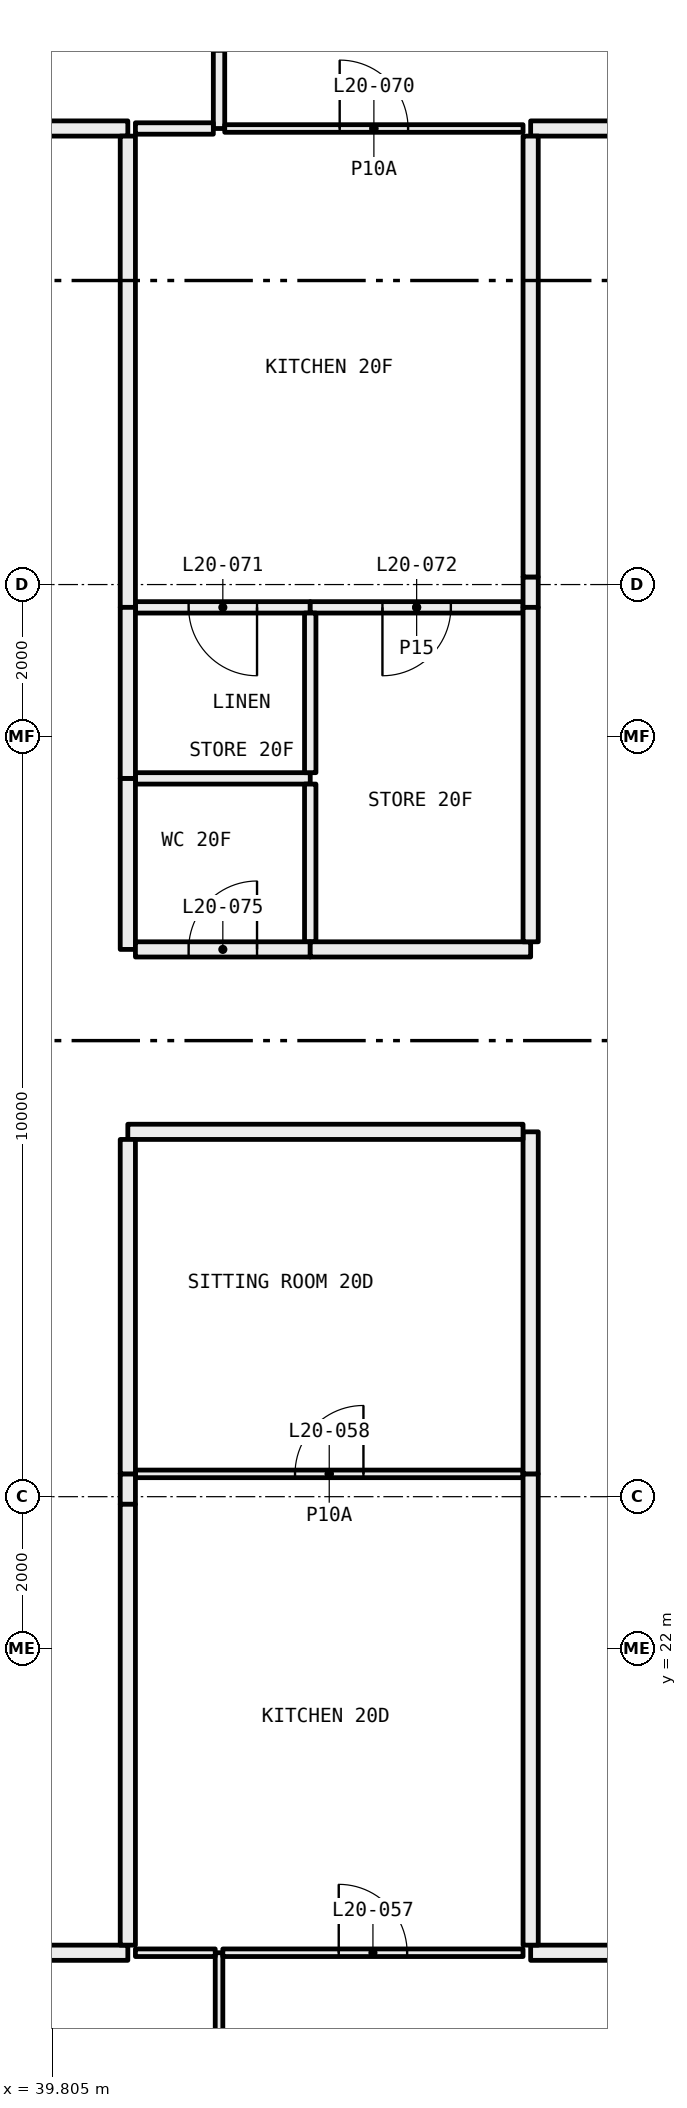
"""IFC4 building model, lengths in metres.
Left out: names, types, materials, properties, quantities, classifications, styles, units other than length and angle.
Written with IfcOpenShell. Run it as: python <this file> out.ifc"""

import sys

from ifc_helpers import new_model, si_unit, direction, frame, frame_2d, origin, place, context, subcontext, project, spatial, rectangle, extrude, element, fill, save


model = new_model("IFC4")
c1 = context("Model", 3, precision=1e-05, world=origin(), true_north=direction((0.0, 1.0)))
c2 = subcontext(c1, "Body", "Model", "MODEL_VIEW")
j1 = project(units=[si_unit("LENGTHUNIT", "METRE"), si_unit("PLANEANGLEUNIT", "RADIAN")], contexts=[c1])
p1 = place(None, origin())
s1 = spatial("IfcSite", under=j1, at=p1, CompositionType="ELEMENT")
p2 = place(p1, origin())
s2 = spatial("IfcBuilding", under=s1, at=p2, CompositionType="ELEMENT")
p3 = place(p2, frame((0.0, 0.0, 81.75)))
s3 = spatial("IfcBuildingStorey", under=s2, at=p3, CompositionType="ELEMENT", Elevation=81.75)
p4 = place(p3, frame((42.0, 12.05, 0.0), z_axis=(0.0, 0.0, 1.0), x_axis=(0.0, 1.0, 0.0)))
e1 = element("IfcWall", 1, at=p4, inside=s3, PredefinedType="PARTITIONING", context=c2, shape_type="SweptSolid", body=[
    extrude(rectangle(XDim=5.95, YDim=0.1, at=frame_2d((2.975, 0.0))), origin(), (0.0, 0.0, 1.0), 2.45),
])
p5 = place(p3, frame((41.95, 18.0, 0.0), z_axis=(0.0, 0.0, 1.0), x_axis=(-1.0, 0.0, 0.0)))
e2 = element("IfcWall", 2, at=p5, inside=s3, PredefinedType="PARTITIONING", context=c2, shape_type="SweptSolid", body=[
    extrude(rectangle(XDim=1.05, YDim=0.1, at=frame_2d((0.525, 0.0))), origin(), (0.0, 0.0, 1.0), 3.05),
])
p6 = place(p3, frame((40.8, 18.0, 0.0), z_axis=(0.0, 0.0, 1.0), x_axis=(-1.0, 0.0, 0.0)))
e3 = element("IfcWall", 3, at=p6, inside=s3, PredefinedType="PARTITIONING", context=c2, shape_type="SweptSolid", body=[
    extrude(rectangle(XDim=2.3, YDim=0.2, at=frame_2d((1.15, 0.0))), origin(), (0.0, 0.0, 1.0), 3.05),
])
p7 = place(p3, frame((46.0, 18.0, 0.0), z_axis=(0.0, 0.0, 1.0), x_axis=(-1.0, 0.0, 0.0)))
e4 = element("IfcWall", 4, at=p7, inside=s3, PredefinedType="PARTITIONING", context=c2, shape_type="SweptSolid", body=[
    extrude(rectangle(XDim=3.95, YDim=0.1, at=frame_2d((1.975, 0.0))), origin(), (0.0, 0.0, 1.0), 3.05),
])
p8 = place(p7, frame((1.525, 0.0, 0.0)))
e5 = element("IfcOpeningElement", 5, at=p8, cuts=e4, PredefinedType="OPENING", context=c2, shape_type="SweptSolid", body=[
    extrude(rectangle(XDim=0.9, YDim=2.1, at=frame_2d((0.45, 1.05))), frame((0.0, 0.06, 0.0), z_axis=(0.0, -1.0, 0.0), x_axis=(1.0, 0.0, 0.0)), (0.0, 0.0, 1.0), 0.12),
])
p9 = place(p3, frame((49.5, 18.0, 0.0), z_axis=(0.0, 0.0, 1.0), x_axis=(-1.0, 0.0, 0.0)))
e6 = element("IfcWall", 6, at=p9, inside=s3, PredefinedType="PARTITIONING", context=c2, shape_type="SweptSolid", body=[
    extrude(rectangle(XDim=3.4, YDim=0.2, at=frame_2d((1.7, 0.0))), origin(), (0.0, 0.0, 1.0), 3.05),
])
p10 = place(p3, frame((46.0, 24.3, 0.0), z_axis=(0.0, 0.0, 1.0), x_axis=(-1.0, 0.0, 0.0)))
e7 = element("IfcWall", 7, at=p10, inside=s3, PredefinedType="PARTITIONING", context=c2, shape_type="SweptSolid", body=[
    extrude(rectangle(XDim=5.1, YDim=0.1, at=frame_2d((2.55, 0.0))), origin(), (0.0, 0.0, 1.0), 3.05),
])
p11 = place(p10, frame((2.1, 0.0, 0.0)))
e8 = element("IfcOpeningElement", 8, at=p11, cuts=e7, PredefinedType="OPENING", context=c2, shape_type="SweptSolid", body=[
    extrude(rectangle(XDim=0.9, YDim=2.1, at=frame_2d((0.45, 1.05))), frame((0.0, 0.06, 0.0), z_axis=(0.0, -1.0, 0.0), x_axis=(1.0, 0.0, 0.0)), (0.0, 0.0, 1.0), 0.12),
])
p12 = place(p3, frame((40.8, 24.3, 0.0), z_axis=(0.0, 0.0, 1.0), x_axis=(0.0, -1.0, 0.0)))
e9 = element("IfcWall", 9, at=p12, inside=s3, PredefinedType="PARTITIONING", context=c2, shape_type="SweptSolid", body=[
    extrude(rectangle(XDim=0.4, YDim=0.2, at=frame_2d((0.2, 0.0))), origin(), (0.0, 0.0, 1.0), 2.45),
])
p13 = place(p3, frame((40.8, 23.9, 0.0), z_axis=(0.0, 0.0, 1.0), x_axis=(0.0, -1.0, 0.0)))
e10 = element("IfcWall", 10, at=p13, inside=s3, PredefinedType="PARTITIONING", context=c2, shape_type="SweptSolid", body=[
    extrude(rectangle(XDim=5.8, YDim=0.2, at=frame_2d((2.9, 0.0))), origin(), (0.0, 0.0, 1.0), 3.05),
])
p14 = place(p3, frame((46.1, 18.1, 0.0), z_axis=(0.0, 0.0, 1.0), x_axis=(0.0, 1.0, 0.0)))
e11 = element("IfcWall", 11, at=p14, inside=s3, PredefinedType="PARTITIONING", context=c2, shape_type="SweptSolid", body=[
    extrude(rectangle(XDim=6.2, YDim=0.2, at=frame_2d((3.1, 0.0))), origin(), (0.0, 0.0, 1.0), 2.45),
])
p15 = place(p3, frame((46.1, 24.3, 0.0), z_axis=(0.0, 0.0, 1.0), x_axis=(0.0, 1.0, 0.0)))
e12 = element("IfcWall", 12, at=p15, inside=s3, PredefinedType="PARTITIONING", context=c2, shape_type="SweptSolid", body=[
    extrude(rectangle(XDim=4.5, YDim=0.2, at=frame_2d((2.25, 0.0))), origin(), (0.0, 0.0, 1.0), 3.05),
])
p16 = place(p3, frame((46.0, 28.8, 0.0), z_axis=(0.0, 0.0, 1.0), x_axis=(-1.0, 0.0, 0.0)))
e13 = element("IfcWall", 13, at=p16, inside=s3, PredefinedType="PARTITIONING", context=c2, shape_type="SweptSolid", body=[
    extrude(rectangle(XDim=5.2, YDim=0.2, at=frame_2d((2.6, 0.0))), origin(), (0.0, 0.0, 1.0), 3.05),
])
p17 = place(p3, frame((40.8, 28.7, 0.0), z_axis=(0.0, 0.0, 1.0), x_axis=(0.0, -1.0, 0.0)))
e14 = element("IfcWall", 14, at=p17, inside=s3, PredefinedType="PARTITIONING", context=c2, shape_type="SweptSolid", body=[
    extrude(rectangle(XDim=4.4, YDim=0.2, at=frame_2d((2.2, 0.0))), origin(), (0.0, 0.0, 1.0), 3.05),
])
p18 = place(p3, frame((42.0, 42.0, 0.0), z_axis=(0.0, 0.0, 1.0), x_axis=(0.0, 1.0, 0.0)))
e15 = element("IfcWall", 15, at=p18, inside=s3, PredefinedType="PARTITIONING", context=c2, shape_type="SweptSolid", body=[
    extrude(rectangle(XDim=2.925, YDim=0.15, at=frame_2d((1.462, 0.0))), origin(), (0.0, 0.0, 1.0), 3.05),
])
p19 = place(p18, frame((1.012, 0.0, 0.0)))
e16 = element("IfcOpeningElement", 16, at=p19, cuts=e15, PredefinedType="OPENING", context=c2, shape_type="SweptSolid", body=[
    extrude(rectangle(XDim=0.9, YDim=2.1, at=frame_2d((0.45, 1.05))), frame((0.0, 0.085, 0.0), z_axis=(0.0, -1.0, 0.0), x_axis=(1.0, 0.0, 0.0)), (0.0, 0.0, 1.0), 0.17),
])
p20 = place(p3, frame((40.9, 42.0, 0.0), z_axis=(0.0, 0.0, 1.0), x_axis=(1.0, 0.0, 0.0)))
e17 = element("IfcWall", 17, at=p20, inside=s3, PredefinedType="PARTITIONING", context=c2, shape_type="SweptSolid", body=[
    extrude(rectangle(XDim=1.025, YDim=0.15, at=frame_2d((0.513, 0.0))), origin(), (0.0, 0.0, 1.0), 3.05),
])
p21 = place(p3, frame((38.5, 42.0, 0.0), z_axis=(0.0, 0.0, 1.0), x_axis=(1.0, 0.0, 0.0)))
e18 = element("IfcWall", 18, at=p21, inside=s3, PredefinedType="PARTITIONING", context=c2, shape_type="SweptSolid", body=[
    extrude(rectangle(XDim=2.3, YDim=0.2, at=frame_2d((1.15, 0.0))), origin(), (0.0, 0.0, 1.0), 3.05),
])
p22 = place(p3, frame((42.075, 42.0, 0.0), z_axis=(0.0, 0.0, 1.0), x_axis=(1.0, 0.0, 0.0)))
e19 = element("IfcWall", 19, at=p22, inside=s3, PredefinedType="PARTITIONING", context=c2, shape_type="SweptSolid", body=[
    extrude(rectangle(XDim=3.925, YDim=0.1, at=frame_2d((1.962, 0.0))), origin(), (0.0, 0.0, 1.0), 3.05),
])
p23 = place(p22, frame((1.512, 0.0, 0.0)))
e20 = element("IfcOpeningElement", 20, at=p23, cuts=e19, PredefinedType="OPENING", context=c2, shape_type="SweptSolid", body=[
    extrude(rectangle(XDim=0.9, YDim=2.1, at=frame_2d((0.45, 1.05))), frame((0.0, 0.06, 0.0), z_axis=(0.0, -1.0, 0.0), x_axis=(1.0, 0.0, 0.0)), (0.0, 0.0, 1.0), 0.12),
])
p24 = place(p3, frame((46.1, 42.0, 0.0), z_axis=(0.0, 0.0, 1.0), x_axis=(1.0, 0.0, 0.0)))
e21 = element("IfcWall", 21, at=p24, inside=s3, PredefinedType="PARTITIONING", context=c2, shape_type="SweptSolid", body=[
    extrude(rectangle(XDim=1.9, YDim=0.2, at=frame_2d((0.95, 0.0))), origin(), (0.0, 0.0, 1.0), 3.05),
])
p25 = place(p3, frame((40.9, 35.7, 0.0), z_axis=(0.0, 0.0, 1.0), x_axis=(1.0, 0.0, 0.0)))
e22 = element("IfcWall", 22, at=p25, inside=s3, PredefinedType="PARTITIONING", context=c2, shape_type="SweptSolid", body=[
    extrude(rectangle(XDim=2.3, YDim=0.15, at=frame_2d((1.15, 0.0))), origin(), (0.0, 0.0, 1.0), 3.05),
])
p26 = place(p25, frame((0.7, 0.0, 0.0)))
e23 = element("IfcOpeningElement", 23, at=p26, cuts=e22, PredefinedType="OPENING", context=c2, shape_type="SweptSolid", body=[
    extrude(rectangle(XDim=0.9, YDim=2.1, at=frame_2d((0.45, 1.05))), frame((0.0, 0.085, 0.0), z_axis=(0.0, -1.0, 0.0), x_axis=(1.0, 0.0, 0.0)), (0.0, 0.0, 1.0), 0.17),
])
p27 = place(p3, frame((43.2, 35.7, 0.0), z_axis=(0.0, 0.0, 1.0), x_axis=(1.0, 0.0, 0.0)))
e24 = element("IfcWall", 24, at=p27, inside=s3, PredefinedType="PARTITIONING", context=c2, shape_type="SweptSolid", body=[
    extrude(rectangle(XDim=2.8, YDim=0.15, at=frame_2d((1.4, 0.0))), origin(), (0.0, 0.0, 1.0), 3.05),
])
p28 = place(p27, frame((0.95, 0.0, 0.0)))
e25 = element("IfcOpeningElement", 25, at=p28, cuts=e24, PredefinedType="OPENING", context=c2, shape_type="SweptSolid", body=[
    extrude(rectangle(XDim=0.9, YDim=2.1, at=frame_2d((0.45, 1.05))), frame((0.0, 0.085, 0.0), z_axis=(0.0, -1.0, 0.0), x_axis=(1.0, 0.0, 0.0)), (0.0, 0.0, 1.0), 0.17),
])
p29 = place(p3, frame((40.8, 41.9, 0.0), z_axis=(0.0, 0.0, 1.0), x_axis=(0.0, -1.0, 0.0)))
e26 = element("IfcWall", 26, at=p29, inside=s3, PredefinedType="PARTITIONING", context=c2, shape_type="SweptSolid", body=[
    extrude(rectangle(XDim=6.2, YDim=0.2, at=frame_2d((3.1, 0.0))), origin(), (0.0, 0.0, 1.0), 2.45),
])
p30 = place(p3, frame((46.1, 35.7, 0.0), z_axis=(0.0, 0.0, 1.0), x_axis=(0.0, 1.0, 0.0)))
e27 = element("IfcWall", 27, at=p30, inside=s3, PredefinedType="PARTITIONING", context=c2, shape_type="SweptSolid", body=[
    extrude(rectangle(XDim=0.4, YDim=0.2, at=frame_2d((0.2, 0.0))), origin(), (0.0, 0.0, 1.0), 2.45),
])
p31 = place(p3, frame((46.1, 36.1, 0.0), z_axis=(0.0, 0.0, 1.0), x_axis=(0.0, 1.0, 0.0)))
e28 = element("IfcWall", 28, at=p31, inside=s3, PredefinedType="PARTITIONING", context=c2, shape_type="SweptSolid", body=[
    extrude(rectangle(XDim=5.8, YDim=0.2, at=frame_2d((2.9, 0.0))), origin(), (0.0, 0.0, 1.0), 3.05),
])
p32 = place(p3, frame((43.2, 33.45, 0.0), z_axis=(0.0, 0.0, 1.0), x_axis=(-1.0, 0.0, 0.0)))
e29 = element("IfcWall", 29, at=p32, inside=s3, PredefinedType="PARTITIONING", context=c2, shape_type="SweptSolid", body=[
    extrude(rectangle(XDim=2.3, YDim=0.15, at=frame_2d((1.15, 0.0))), origin(), (0.0, 0.0, 1.0), 3.05),
])
p33 = place(p3, frame((43.2, 31.3, 0.0), z_axis=(0.0, 0.0, 1.0), x_axis=(0.0, 1.0, 0.0)))
e30 = element("IfcWall", 30, at=p33, inside=s3, PredefinedType="PARTITIONING", context=c2, shape_type="SweptSolid", body=[
    extrude(rectangle(XDim=2.075, YDim=0.15, at=frame_2d((1.038, 0.0))), origin(), (0.0, 0.0, 1.0), 3.05),
])
p34 = place(p3, frame((40.8, 33.45, 0.0), z_axis=(0.0, 0.0, 1.0), x_axis=(0.0, -1.0, 0.0)))
e31 = element("IfcWall", 31, at=p34, inside=s3, PredefinedType="PARTITIONING", context=c2, shape_type="SweptSolid", body=[
    extrude(rectangle(XDim=2.25, YDim=0.2, at=frame_2d((1.125, 0.0))), origin(), (0.0, 0.0, 1.0), 3.05),
])
p35 = place(p3, frame((40.9, 31.2, 0.0), z_axis=(0.0, 0.0, 1.0), x_axis=(1.0, 0.0, 0.0)))
e32 = element("IfcWall", 32, at=p35, inside=s3, PredefinedType="PARTITIONING", context=c2, shape_type="SweptSolid", body=[
    extrude(rectangle(XDim=2.3, YDim=0.2, at=frame_2d((1.15, 0.0))), origin(), (0.0, 0.0, 1.0), 3.05),
])
p36 = place(p35, frame((0.7, 0.0, 0.0)))
e33 = element("IfcOpeningElement", 33, at=p36, cuts=e32, PredefinedType="OPENING", context=c2, shape_type="SweptSolid", body=[
    extrude(rectangle(XDim=0.9, YDim=2.1, at=frame_2d((0.45, 1.05))), frame((0.0, 0.11, 0.0), z_axis=(0.0, -1.0, 0.0), x_axis=(1.0, 0.0, 0.0)), (0.0, 0.0, 1.0), 0.22),
])
p37 = place(p3, frame((43.2, 33.525, 0.0), z_axis=(0.0, 0.0, 1.0), x_axis=(0.0, 1.0, 0.0)))
e34 = element("IfcWall", 34, at=p37, inside=s3, PredefinedType="PARTITIONING", context=c2, shape_type="SweptSolid", body=[
    extrude(rectangle(XDim=2.1, YDim=0.15, at=frame_2d((1.05, 0.0))), origin(), (0.0, 0.0, 1.0), 3.05),
])
p38 = place(p3, frame((40.8, 35.7, 0.0), z_axis=(0.0, 0.0, 1.0), x_axis=(0.0, -1.0, 0.0)))
e35 = element("IfcWall", 35, at=p38, inside=s3, PredefinedType="PARTITIONING", context=c2, shape_type="SweptSolid", body=[
    extrude(rectangle(XDim=2.25, YDim=0.2, at=frame_2d((1.125, 0.0))), origin(), (0.0, 0.0, 1.0), 3.05),
])
p39 = place(p3, frame((43.2, 31.2, 0.0), z_axis=(0.0, 0.0, 1.0), x_axis=(1.0, 0.0, 0.0)))
e36 = element("IfcWall", 36, at=p39, inside=s3, PredefinedType="PARTITIONING", context=c2, shape_type="SweptSolid", body=[
    extrude(rectangle(XDim=2.9, YDim=0.2, at=frame_2d((1.45, 0.0))), origin(), (0.0, 0.0, 1.0), 3.05),
])
p40 = place(p3, frame((46.1, 31.3, 0.0), z_axis=(0.0, 0.0, 1.0), x_axis=(0.0, 1.0, 0.0)))
e37 = element("IfcWall", 37, at=p40, inside=s3, PredefinedType="PARTITIONING", context=c2, shape_type="SweptSolid", body=[
    extrude(rectangle(XDim=4.4, YDim=0.2, at=frame_2d((2.2, 0.0))), origin(), (0.0, 0.0, 1.0), 3.05),
])
p41 = place(p8, frame((0.9, 0.0, 0.0), x_axis=(-1.0, 0.0, 0.0)))
e38 = element("IfcDoor", 38, at=p41, inside=s3, OperationType="SINGLE_SWING_RIGHT", PredefinedType="DOOR", context=c2, shape_type="SweptSolid", body=[
    extrude(rectangle(XDim=0.9, YDim=2.1, at=frame_2d((0.45, 1.05))), frame((0.0, 0.025, 0.0), z_axis=(0.0, -1.0, 0.0), x_axis=(1.0, 0.0, 0.0)), (0.0, 0.0, 1.0), 0.05),
])
fill(e5, e38)
p42 = place(p11, frame((0.9, 0.0, 0.0), x_axis=(-1.0, 0.0, 0.0)))
e39 = element("IfcDoor", 39, at=p42, inside=s3, OperationType="SINGLE_SWING_LEFT", PredefinedType="DOOR", context=c2, shape_type="SweptSolid", body=[
    extrude(rectangle(XDim=0.9, YDim=2.1, at=frame_2d((0.45, 1.05))), frame((0.0, 0.025, 0.0), z_axis=(0.0, -1.0, 0.0), x_axis=(1.0, 0.0, 0.0)), (0.0, 0.0, 1.0), 0.05),
])
fill(e8, e39)
p43 = place(p23, origin())
e40 = element("IfcDoor", 40, at=p43, inside=s3, OperationType="SINGLE_SWING_RIGHT", PredefinedType="DOOR", context=c2, shape_type="SweptSolid", body=[
    extrude(rectangle(XDim=0.9, YDim=2.1, at=frame_2d((0.45, 1.05))), frame((0.0, 0.025, 0.0), z_axis=(0.0, -1.0, 0.0), x_axis=(1.0, 0.0, 0.0)), (0.0, 0.0, 1.0), 0.05),
])
fill(e20, e40)
p44 = place(p26, frame((0.9, 0.0, 0.0), x_axis=(-1.0, 0.0, 0.0)))
e41 = element("IfcDoor", 41, at=p44, inside=s3, OperationType="SINGLE_SWING_RIGHT", PredefinedType="DOOR", context=c2, shape_type="SweptSolid", body=[
    extrude(rectangle(XDim=0.9, YDim=2.1, at=frame_2d((0.45, 1.05))), frame((0.0, 0.025, 0.0), z_axis=(0.0, -1.0, 0.0), x_axis=(1.0, 0.0, 0.0)), (0.0, 0.0, 1.0), 0.05),
])
fill(e23, e41)
p45 = place(p28, frame((0.9, 0.0, 0.0), x_axis=(-1.0, 0.0, 0.0)))
e42 = element("IfcDoor", 42, at=p45, inside=s3, OperationType="SINGLE_SWING_LEFT", PredefinedType="DOOR", context=c2, shape_type="SweptSolid", body=[
    extrude(rectangle(XDim=0.9, YDim=2.1, at=frame_2d((0.45, 1.05))), frame((0.0, 0.025, 0.0), z_axis=(0.0, -1.0, 0.0), x_axis=(1.0, 0.0, 0.0)), (0.0, 0.0, 1.0), 0.05),
])
fill(e25, e42)
p46 = place(p36, origin())
e43 = element("IfcDoor", 43, at=p46, inside=s3, OperationType="SINGLE_SWING_LEFT", PredefinedType="DOOR", context=c2, shape_type="SweptSolid", body=[
    extrude(rectangle(XDim=0.9, YDim=2.1, at=frame_2d((0.45, 1.05))), frame((0.0, 0.025, 0.0), z_axis=(0.0, -1.0, 0.0), x_axis=(1.0, 0.0, 0.0)), (0.0, 0.0, 1.0), 0.05),
])
fill(e33, e43)
save(model, sys.argv[1])
